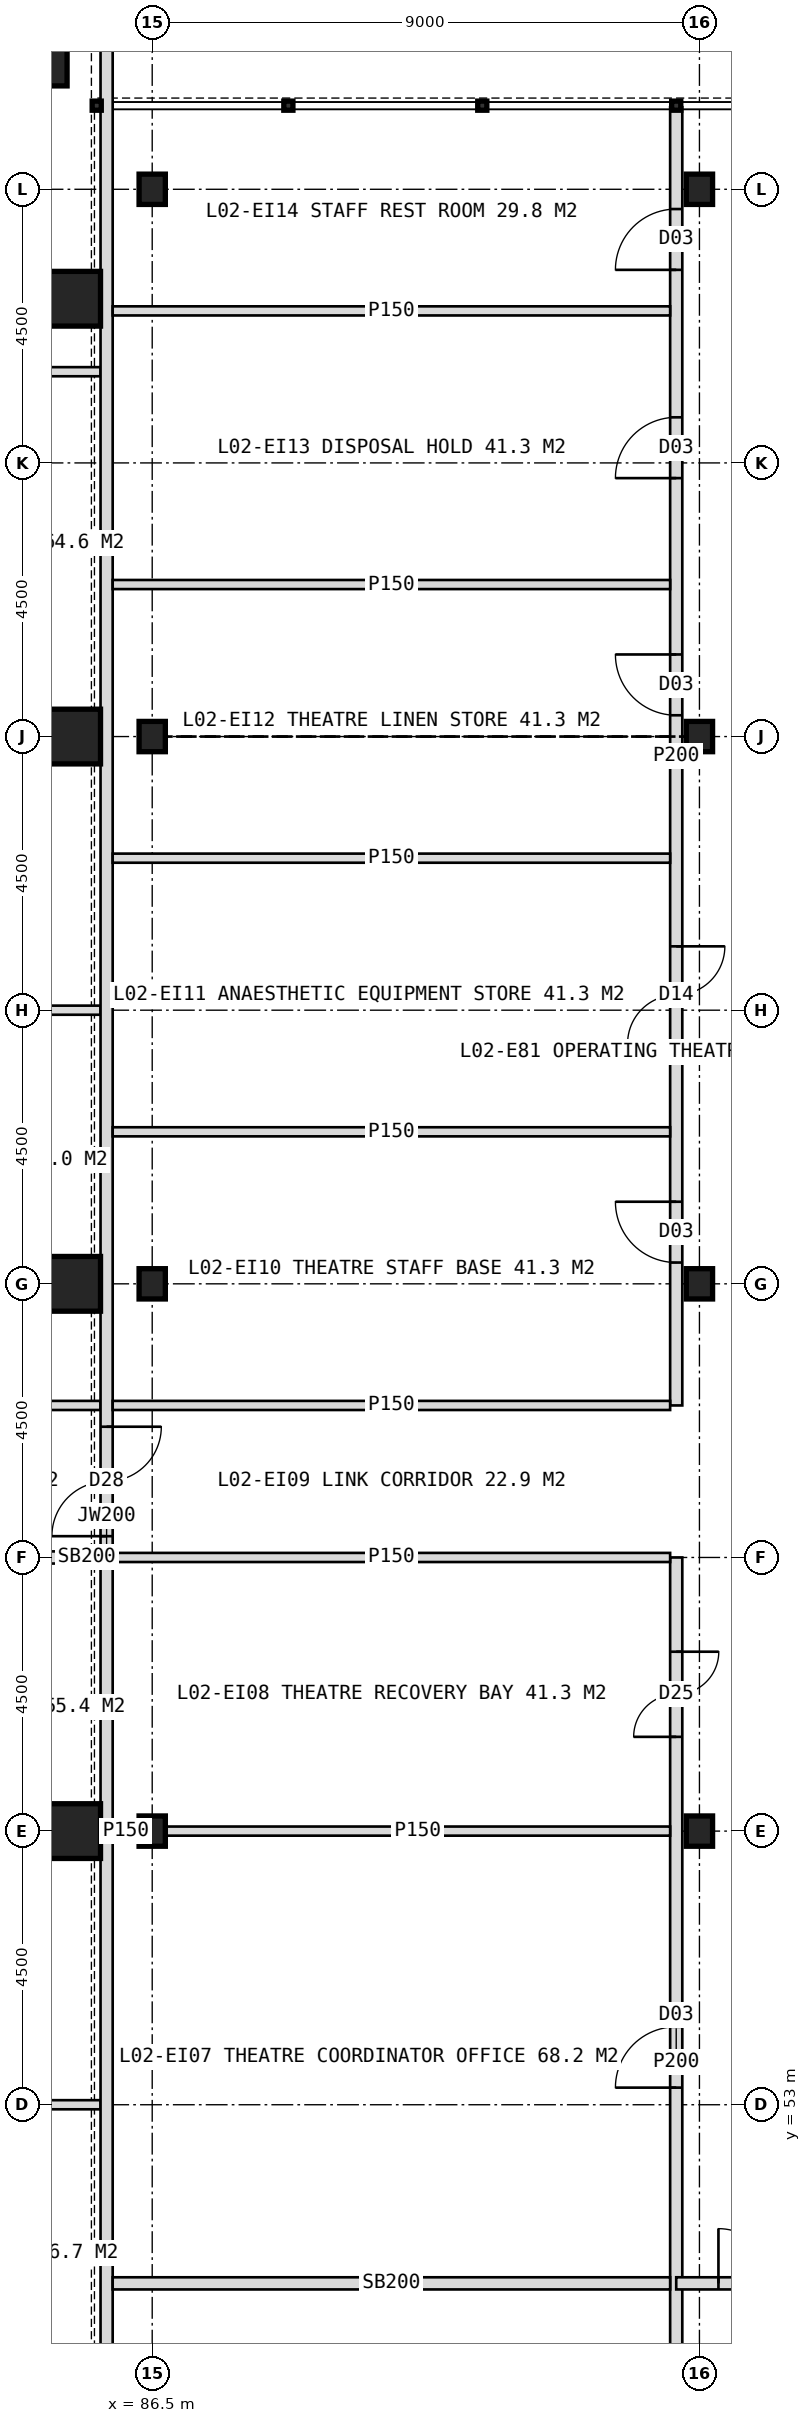
"""IFC4 building model, lengths in metres.
Left out: names, types, materials, properties, quantities, classifications, styles, units other than length and angle.
Written with IfcOpenShell. Run it as: python <this file> out.ifc"""

import sys

from ifc_helpers import new_model, si_unit, direction, frame, frame_2d, origin, origin_2d, place, context, subcontext, project, spatial, rectangle, hollow_rectangle, i_section, extrude, element, fill, save


model = new_model("IFC4")
c1 = context("Model", 3, precision=1e-05, world=origin(), true_north=direction((0.0, 1.0)))
c2 = subcontext(c1, "Body", "Model", "MODEL_VIEW")
j1 = project(units=[si_unit("LENGTHUNIT", "METRE"), si_unit("PLANEANGLEUNIT", "RADIAN")], contexts=[c1])
p1 = place(None, origin())
s1 = spatial("IfcSite", under=j1, at=p1, CompositionType="ELEMENT")
p2 = place(p1, origin())
s2 = spatial("IfcBuilding", under=s1, at=p2, CompositionType="ELEMENT")
p3 = place(p2, frame((0.0, 0.0, 11.0)))
s3 = spatial("IfcBuildingStorey", under=s2, at=p3, CompositionType="ELEMENT", Elevation=11.0)
for number, where, z_axis, x_axis in (
    (1, (85.2, 57.5, 0.0), (0.0, 0.0, 1.0), (1.0, 0.0, 0.0)),
    (2, (85.2, 66.5, 0.0), (0.0, 0.0, 1.0), (1.0, 0.0, 0.0)),
    (3, (85.2, 75.5, 0.0), (0.0, 0.0, 1.0), (1.0, 0.0, 0.0)),
    (4, (85.2, 82.7, 0.0), (0.0, 0.0, 1.0), (1.0, 0.0, 0.0)),
    (5, (84.65, 86.65, 0.0), (0.0, 0.0, 1.0), (1.0, 0.0, 0.0)),
):
    element("IfcColumn", number, at=place(p3, frame(where, z_axis=z_axis, x_axis=x_axis)), inside=s3, PredefinedType="COLUMN", context=c2, shape_type="SweptSolid", body=[
        extrude(hollow_rectangle(XDim=0.9, YDim=0.9, WallThickness=0.08, at=origin_2d()), origin(), (0.0, 0.0, 1.0), 5.5),
    ])
for number, where, z_axis, x_axis in (
    (6, (86.5, 57.5, 0.0), (0.0, 0.0, 1.0), (1.0, 0.0, 0.0)),
    (7, (86.5, 66.5, 0.0), (0.0, 0.0, 1.0), (1.0, 0.0, 0.0)),
    (8, (86.5, 75.5, 0.0), (0.0, 0.0, 1.0), (1.0, 0.0, 0.0)),
    (9, (86.5, 84.5, 0.0), (0.0, 0.0, 1.0), (1.0, 0.0, 0.0)),
    (10, (95.5, 57.5, 0.0), (0.0, 0.0, 1.0), (1.0, 0.0, 0.0)),
    (11, (95.5, 66.5, 0.0), (0.0, 0.0, 1.0), (1.0, 0.0, 0.0)),
    (12, (95.5, 75.5, 0.0), (0.0, 0.0, 1.0), (1.0, 0.0, 0.0)),
    (13, (95.5, 84.5, 0.0), (0.0, 0.0, 1.0), (1.0, 0.0, 0.0)),
):
    element("IfcColumn", number, at=place(p3, frame(where, z_axis=z_axis, x_axis=x_axis)), inside=s3, PredefinedType="COLUMN", context=c2, shape_type="SweptSolid", body=[
        extrude(i_section(OverallWidth=0.432, OverallDepth=0.498, WebThickness=0.056, FlangeThickness=0.089, FilletRadius=0.015, at=origin_2d()), origin(), (0.0, 0.0, 1.0), 5.5),
    ])
for number, where, z_axis, x_axis in (
    (14, (79.5, 81.5, 0.0), (0.0, 0.0, 1.0), (1.0, 0.0, 0.0)),
    (15, (79.5, 71.0, 0.0), (0.0, 0.0, 1.0), (1.0, 0.0, 0.0)),
    (16, (79.5, 64.5, 0.0), (0.0, 0.0, 1.0), (1.0, 0.0, 0.0)),
):
    element("IfcWall", number, at=place(p3, frame(where, z_axis=z_axis, x_axis=x_axis)), inside=s3, PredefinedType="PARTITIONING", context=c2, shape_type="SweptSolid", body=[
        extrude(rectangle(XDim=6.15, YDim=0.15, at=frame_2d((3.075, 0.0))), origin(), (0.0, 0.0, 1.0), 5.2),
    ])
p4 = place(p3, frame((79.5, 62.0, 0.0), z_axis=(0.0, 0.0, 1.0), x_axis=(1.0, 0.0, 0.0)))
e17 = element("IfcWall", 17, at=p4, inside=s3, PredefinedType="SOLIDWALL", context=c2, shape_type="SweptSolid", body=[
    extrude(rectangle(XDim=5.7, YDim=0.2, at=frame_2d((2.85, 0.0))), origin(), (0.0, 0.0, 1.0), 4.4),
])
p5 = place(p3, frame((85.2, 62.0, 0.0), z_axis=(0.0, 0.0, 1.0), x_axis=(1.0, 0.0, 0.0)))
e18 = element("IfcWall", 18, at=p5, inside=s3, PredefinedType="SOLIDWALL", context=c2, shape_type="SweptSolid", body=[
    extrude(rectangle(XDim=0.45, YDim=0.2, at=frame_2d((0.225, 0.0))), origin(), (0.0, 0.0, 1.0), 5.2),
])
p6 = place(p3, frame((79.5, 53.0, 0.0), z_axis=(0.0, 0.0, 1.0), x_axis=(1.0, 0.0, 0.0)))
e19 = element("IfcWall", 19, at=p6, inside=s3, PredefinedType="PARTITIONING", context=c2, shape_type="SweptSolid", body=[
    extrude(rectangle(XDim=6.15, YDim=0.15, at=frame_2d((3.075, 0.0))), origin(), (0.0, 0.0, 1.0), 5.2),
])
p7 = place(p3, frame((95.118, 45.4, 0.0), z_axis=(0.0, 0.0, 1.0), x_axis=(0.0, 1.0, 0.0)))
e20 = element("IfcWall", 20, at=p7, inside=s3, PredefinedType="PARTITIONING", context=c2, shape_type="SweptSolid", body=[
    extrude(rectangle(XDim=16.6, YDim=0.2, at=frame_2d((8.3, 0.0))), origin(), (0.0, 0.0, 1.0), 5.2),
])
p8 = place(p7, frame((1.181, 0.0, 0.0)))
e21 = element("IfcOpeningElement", 21, at=p8, cuts=e20, PredefinedType="OPENING", context=c2, shape_type="SweptSolid", body=[
    extrude(rectangle(XDim=1.6, YDim=2.2, at=frame_2d((0.8, 1.1))), frame((0.0, 0.11, 0.0), z_axis=(0.0, -1.0, 0.0), x_axis=(1.0, 0.0, 0.0)), (0.0, 0.0, 1.0), 0.22),
])
p9 = place(p7, frame((7.881, 0.0, 0.0)))
e22 = element("IfcOpeningElement", 22, at=p9, cuts=e20, PredefinedType="OPENING", context=c2, shape_type="SweptSolid", body=[
    extrude(rectangle(XDim=1.0, YDim=2.1, at=frame_2d((0.5, 1.05))), frame((0.0, 0.11, 0.0), z_axis=(0.0, -1.0, 0.0), x_axis=(1.0, 0.0, 0.0)), (0.0, 0.0, 1.0), 0.22),
])
p10 = place(p7, frame((13.65, 0.0, 0.0)))
e23 = element("IfcOpeningElement", 23, at=p10, cuts=e20, PredefinedType="OPENING", context=c2, shape_type="SweptSolid", body=[
    extrude(rectangle(XDim=1.4, YDim=2.2, at=frame_2d((0.7, 1.1))), frame((0.0, 0.11, 0.0), z_axis=(0.0, -1.0, 0.0), x_axis=(1.0, 0.0, 0.0)), (0.0, 0.0, 1.0), 0.22),
])
p11 = place(p3, frame((95.118, 64.5, 0.0), z_axis=(0.0, 0.0, 1.0), x_axis=(0.0, 1.0, 0.0)))
e24 = element("IfcWall", 24, at=p11, inside=s3, PredefinedType="PARTITIONING", context=c2, shape_type="SweptSolid", body=[
    extrude(rectangle(XDim=21.35, YDim=0.2, at=frame_2d((10.675, 0.0))), origin(), (0.0, 0.0, 1.0), 5.2),
])
p12 = place(p11, frame((2.35, 0.0, 0.0)))
e25 = element("IfcOpeningElement", 25, at=p12, cuts=e24, PredefinedType="OPENING", context=c2, shape_type="SweptSolid", body=[
    extrude(rectangle(XDim=1.0, YDim=2.1, at=frame_2d((0.5, 1.05))), frame((0.0, 0.11, 0.0), z_axis=(0.0, -1.0, 0.0), x_axis=(1.0, 0.0, 0.0)), (0.0, 0.0, 1.0), 0.22),
])
p13 = place(p11, frame((5.95, 0.0, 0.0)))
e26 = element("IfcOpeningElement", 26, at=p13, cuts=e24, PredefinedType="OPENING", context=c2, shape_type="SweptSolid", body=[
    extrude(rectangle(XDim=1.6, YDim=2.2, at=frame_2d((0.8, 1.1))), frame((0.0, 0.11, 0.0), z_axis=(0.0, -1.0, 0.0), x_axis=(1.0, 0.0, 0.0)), (0.0, 0.0, 1.0), 0.22),
])
p14 = place(p11, frame((11.35, 0.0, 0.0)))
e27 = element("IfcOpeningElement", 27, at=p14, cuts=e24, PredefinedType="OPENING", context=c2, shape_type="SweptSolid", body=[
    extrude(rectangle(XDim=1.0, YDim=2.1, at=frame_2d((0.5, 1.05))), frame((0.0, 0.11, 0.0), z_axis=(0.0, -1.0, 0.0), x_axis=(1.0, 0.0, 0.0)), (0.0, 0.0, 1.0), 0.22),
])
p15 = place(p11, frame((15.25, 0.0, 0.0)))
e28 = element("IfcOpeningElement", 28, at=p15, cuts=e24, PredefinedType="OPENING", context=c2, shape_type="SweptSolid", body=[
    extrude(rectangle(XDim=1.0, YDim=2.1, at=frame_2d((0.5, 1.05))), frame((0.0, 0.11, 0.0), z_axis=(0.0, -1.0, 0.0), x_axis=(1.0, 0.0, 0.0)), (0.0, 0.0, 1.0), 0.22),
])
p16 = place(p11, frame((18.675, 0.0, 0.0)))
e29 = element("IfcOpeningElement", 29, at=p16, cuts=e24, PredefinedType="OPENING", context=c2, shape_type="SweptSolid", body=[
    extrude(rectangle(XDim=1.0, YDim=2.1, at=frame_2d((0.5, 1.05))), frame((0.0, 0.11, 0.0), z_axis=(0.0, -1.0, 0.0), x_axis=(1.0, 0.0, 0.0)), (0.0, 0.0, 1.0), 0.22),
])
p17 = place(p3, frame((98.307, 50.062, 0.0), z_axis=(0.0, 0.0, 1.0), x_axis=(-1.0, 0.0, 0.0)))
e30 = element("IfcWall", 30, at=p17, inside=s3, PredefinedType="SOLIDWALL", context=c2, shape_type="SweptSolid", body=[
    extrude(rectangle(XDim=3.189, YDim=0.2, at=frame_2d((1.594, 0.0))), origin(), (0.0, 0.0, 1.0), 5.2),
])
p18 = place(p17, frame((0.695, 0.0, 0.0)))
e31 = element("IfcOpeningElement", 31, at=p18, cuts=e30, PredefinedType="OPENING", context=c2, shape_type="SweptSolid", body=[
    extrude(rectangle(XDim=1.8, YDim=2.2, at=frame_2d((0.9, 1.1))), frame((0.0, 0.11, 0.0), z_axis=(0.0, -1.0, 0.0), x_axis=(1.0, 0.0, 0.0)), (0.0, 0.0, 1.0), 0.22),
])
p19 = place(p3, frame((85.75, 36.8, 0.0), z_axis=(0.0, 0.0, 1.0), x_axis=(0.0, 1.0, 0.0)))
e32 = element("IfcWall", 32, at=p19, inside=s3, PredefinedType="SOLIDWALL", context=c2, shape_type="SweptSolid", body=[
    extrude(rectangle(XDim=50.4, YDim=0.2, at=frame_2d((25.2, 0.0))), origin(), (0.0, 0.0, 1.0), 5.2),
])
p20 = place(p19, frame((6.25, 0.0, 0.0)))
e33 = element("IfcOpeningElement", 33, at=p20, cuts=e32, PredefinedType="OPENING", context=c2, shape_type="SweptSolid", body=[
    extrude(rectangle(XDim=1.8, YDim=2.2, at=frame_2d((0.9, 1.1))), frame((0.0, 0.11, 0.0), z_axis=(0.0, -1.0, 0.0), x_axis=(1.0, 0.0, 0.0)), (0.0, 0.0, 1.0), 0.22),
])
p21 = place(p19, frame((25.55, 0.0, 0.0)))
e34 = element("IfcOpeningElement", 34, at=p21, cuts=e32, PredefinedType="OPENING", context=c2, shape_type="SweptSolid", body=[
    extrude(rectangle(XDim=1.8, YDim=2.2, at=frame_2d((0.9, 1.1))), frame((0.0, 0.11, 0.0), z_axis=(0.0, -1.0, 0.0), x_axis=(1.0, 0.0, 0.0)), (0.0, 0.0, 1.0), 0.22),
])
p22 = place(p3, frame((95.018, 50.062, 0.0), z_axis=(0.0, 0.0, 1.0), x_axis=(-1.0, 0.0, 0.0)))
e35 = element("IfcWall", 35, at=p22, inside=s3, PredefinedType="SOLIDWALL", context=c2, shape_type="SweptSolid", body=[
    extrude(rectangle(XDim=9.168, YDim=0.2, at=frame_2d((4.584, 0.0))), origin(), (0.0, 0.0, 1.0), 5.2),
])
p23 = place(p3, frame((95.018, 57.5, 0.0), z_axis=(0.0, 0.0, 1.0), x_axis=(-1.0, 0.0, 0.0)))
e36 = element("IfcWall", 36, at=p23, inside=s3, PredefinedType="PARTITIONING", context=c2, shape_type="SweptSolid", body=[
    extrude(rectangle(XDim=8.302, YDim=0.15, at=frame_2d((4.151, 0.0))), origin(), (0.0, 0.0, 1.0), 4.4),
])
p24 = place(p3, frame((86.284, 57.5, 0.0), z_axis=(0.0, 0.0, 1.0), x_axis=(-1.0, 0.0, 0.0)))
e37 = element("IfcWall", 37, at=p24, inside=s3, PredefinedType="PARTITIONING", context=c2, shape_type="SweptSolid", body=[
    extrude(rectangle(XDim=0.434, YDim=0.15, at=frame_2d((0.217, 0.0))), origin(), (0.0, 0.0, 1.0), 5.2),
])
for number, where, z_axis, x_axis in (
    (38, (95.018, 62.0, 0.0), (0.0, 0.0, 1.0), (-1.0, 0.0, 0.0)),
    (39, (95.018, 64.5, 0.0), (0.0, 0.0, 1.0), (-1.0, 0.0, 0.0)),
    (40, (95.018, 69.0, 0.0), (0.0, 0.0, 1.0), (-1.0, 0.0, 0.0)),
    (41, (95.018, 73.5, 0.0), (0.0, 0.0, 1.0), (-1.0, 0.0, 0.0)),
    (42, (95.018, 78.0, 0.0), (0.0, 0.0, 1.0), (-1.0, 0.0, 0.0)),
    (43, (95.018, 82.5, 0.0), (0.0, 0.0, 1.0), (-1.0, 0.0, 0.0)),
):
    element("IfcWall", number, at=place(p3, frame(where, z_axis=z_axis, x_axis=x_axis)), inside=s3, PredefinedType="PARTITIONING", context=c2, shape_type="SweptSolid", body=[
        extrude(rectangle(XDim=9.168, YDim=0.15, at=frame_2d((4.584, 0.0))), origin(), (0.0, 0.0, 1.0), 5.2),
    ])
p25 = place(p18, origin())
e44 = element("IfcDoor", 44, at=p25, inside=s3, OperationType="DOUBLE_DOOR_DOUBLE_SWING", PredefinedType="DOOR", context=c2, shape_type="SweptSolid", body=[
    extrude(rectangle(XDim=1.8, YDim=2.2, at=frame_2d((0.9, 1.1))), frame((0.0, 0.025, 0.0), z_axis=(0.0, -1.0, 0.0), x_axis=(1.0, 0.0, 0.0)), (0.0, 0.0, 1.0), 0.05),
])
fill(e31, e44)
p26 = place(p21, origin())
e45 = element("IfcDoor", 45, at=p26, inside=s3, OperationType="DOUBLE_DOOR_SINGLE_SWING", PredefinedType="DOOR", context=c2, shape_type="SweptSolid", body=[
    extrude(rectangle(XDim=1.8, YDim=2.2, at=frame_2d((0.9, 1.1))), frame((0.0, 0.025, 0.0), z_axis=(0.0, -1.0, 0.0), x_axis=(1.0, 0.0, 0.0)), (0.0, 0.0, 1.0), 0.05),
])
fill(e34, e45)
p27 = place(p9, origin())
e46 = element("IfcDoor", 46, at=p27, inside=s3, OperationType="SINGLE_SWING_LEFT", PredefinedType="DOOR", context=c2, shape_type="SweptSolid", body=[
    extrude(rectangle(XDim=1.0, YDim=2.1, at=frame_2d((0.5, 1.05))), frame((0.0, 0.025, 0.0), z_axis=(0.0, -1.0, 0.0), x_axis=(1.0, 0.0, 0.0)), (0.0, 0.0, 1.0), 0.05),
])
fill(e22, e46)
p28 = place(p10, origin())
e47 = element("IfcDoor", 47, at=p28, inside=s3, OperationType="DOUBLE_DOOR_SINGLE_SWING", PredefinedType="DOOR", context=c2, shape_type="SweptSolid", body=[
    extrude(rectangle(XDim=1.4, YDim=2.2, at=frame_2d((0.7, 1.1))), frame((0.0, 0.025, 0.0), z_axis=(0.0, -1.0, 0.0), x_axis=(1.0, 0.0, 0.0)), (0.0, 0.0, 1.0), 0.05),
])
fill(e23, e47)
p29 = place(p12, origin())
e48 = element("IfcDoor", 48, at=p29, inside=s3, OperationType="SINGLE_SWING_RIGHT", PredefinedType="DOOR", context=c2, shape_type="SweptSolid", body=[
    extrude(rectangle(XDim=1.0, YDim=2.1, at=frame_2d((0.5, 1.05))), frame((0.0, 0.025, 0.0), z_axis=(0.0, -1.0, 0.0), x_axis=(1.0, 0.0, 0.0)), (0.0, 0.0, 1.0), 0.05),
])
fill(e25, e48)
p30 = place(p13, origin())
e49 = element("IfcDoor", 49, at=p30, inside=s3, OperationType="DOUBLE_DOOR_DOUBLE_SWING", PredefinedType="DOOR", context=c2, shape_type="SweptSolid", body=[
    extrude(rectangle(XDim=1.6, YDim=2.2, at=frame_2d((0.8, 1.1))), frame((0.0, 0.025, 0.0), z_axis=(0.0, -1.0, 0.0), x_axis=(1.0, 0.0, 0.0)), (0.0, 0.0, 1.0), 0.05),
])
fill(e26, e49)
p31 = place(p14, origin())
e50 = element("IfcDoor", 50, at=p31, inside=s3, OperationType="SINGLE_SWING_RIGHT", PredefinedType="DOOR", context=c2, shape_type="SweptSolid", body=[
    extrude(rectangle(XDim=1.0, YDim=2.1, at=frame_2d((0.5, 1.05))), frame((0.0, 0.025, 0.0), z_axis=(0.0, -1.0, 0.0), x_axis=(1.0, 0.0, 0.0)), (0.0, 0.0, 1.0), 0.05),
])
fill(e27, e50)
p32 = place(p15, origin())
e51 = element("IfcDoor", 51, at=p32, inside=s3, OperationType="SINGLE_SWING_LEFT", PredefinedType="DOOR", context=c2, shape_type="SweptSolid", body=[
    extrude(rectangle(XDim=1.0, YDim=2.1, at=frame_2d((0.5, 1.05))), frame((0.0, 0.025, 0.0), z_axis=(0.0, -1.0, 0.0), x_axis=(1.0, 0.0, 0.0)), (0.0, 0.0, 1.0), 0.05),
])
fill(e28, e51)
p33 = place(p16, origin())
e52 = element("IfcDoor", 52, at=p33, inside=s3, OperationType="SINGLE_SWING_LEFT", PredefinedType="DOOR", context=c2, shape_type="SweptSolid", body=[
    extrude(rectangle(XDim=1.0, YDim=2.1, at=frame_2d((0.5, 1.05))), frame((0.0, 0.025, 0.0), z_axis=(0.0, -1.0, 0.0), x_axis=(1.0, 0.0, 0.0)), (0.0, 0.0, 1.0), 0.05),
])
fill(e29, e52)
save(model, sys.argv[1])
